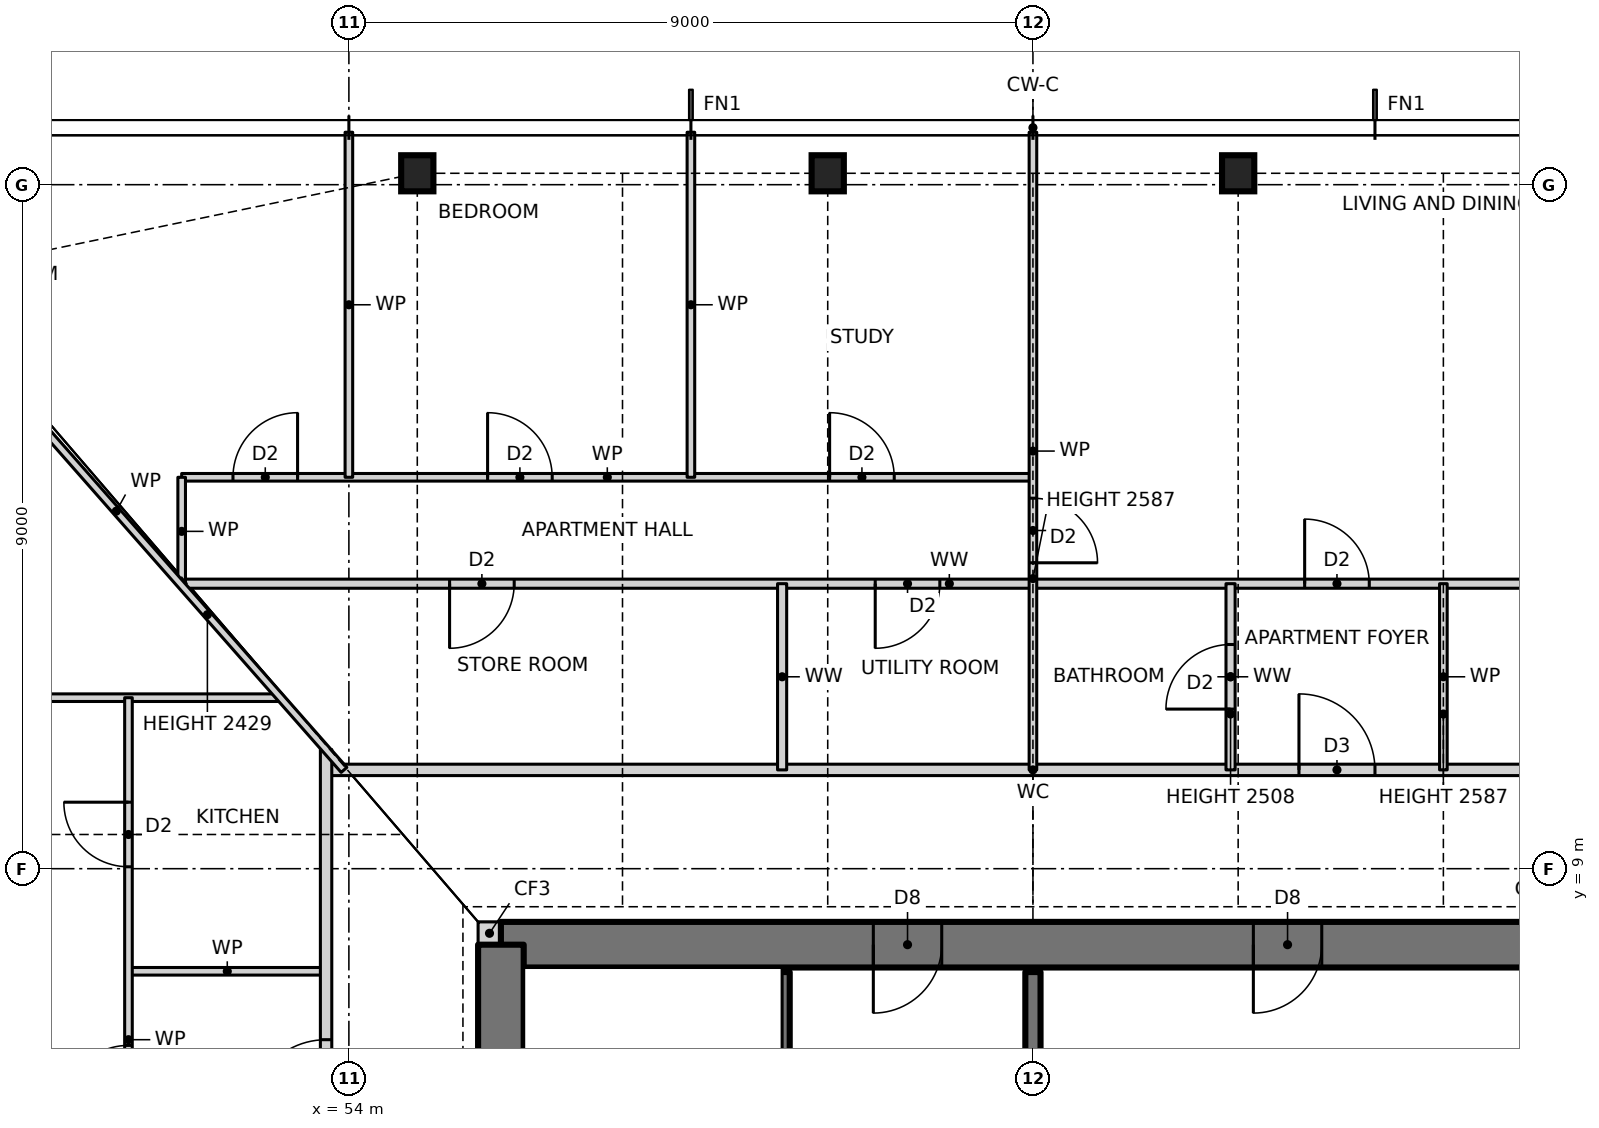
"""IFC4 building model, lengths in metres.
Left out: names, types, materials, properties, quantities, classifications, styles, units other than length and angle.
Written with IfcOpenShell. Run it as: python <this file> out.ifc"""

import sys

from ifc_helpers import new_model, si_unit, direction, frame, frame_2d, origin, origin_2d, place, context, subcontext, project, spatial, rectangle, i_section, extrude, element, fill, save


model = new_model("IFC4")
c1 = context("Model", 3, precision=1e-05, world=origin(), true_north=direction((0.0, 1.0)))
c2 = subcontext(c1, "Body", "Model", "MODEL_VIEW")
j1 = project(units=[si_unit("LENGTHUNIT", "METRE"), si_unit("PLANEANGLEUNIT", "RADIAN")], contexts=[c1])
p1 = place(None, origin())
s1 = spatial("IfcSite", under=j1, at=p1, CompositionType="ELEMENT")
p2 = place(p1, origin())
s2 = spatial("IfcBuilding", under=s1, at=p2, CompositionType="ELEMENT")
p3 = place(p2, frame((0.0, 0.0, 64.0)))
s3 = spatial("IfcBuildingStorey", under=s2, at=p3, CompositionType="ELEMENT", Elevation=64.0)
for number, where, z_axis, x_axis in (
    (1, (65.7, 18.15, 0.0), (0.0, 0.0, 1.0), (1.0, 0.0, 0.0)),
    (2, (60.3, 18.15, 0.0), (0.0, 0.0, 1.0), (1.0, 0.0, 0.0)),
    (3, (54.9, 18.15, 0.0), (0.0, 0.0, 1.0), (1.0, 0.0, 0.0)),
):
    element("IfcColumn", number, at=place(p3, frame(where, z_axis=z_axis, x_axis=x_axis)), inside=s3, PredefinedType="COLUMN", context=c2, shape_type="SweptSolid", body=[
        extrude(i_section(OverallWidth=0.424, OverallDepth=0.475, WebThickness=0.048, FlangeThickness=0.077, at=origin_2d()), origin(), (0.0, 0.0, 1.0), 3.5),
    ])
p4 = place(p3, frame((55.7, 8.15, 0.0), z_axis=(0.0, 0.0, 1.0), x_axis=(1.0, 0.0, 0.0)))
e4 = element("IfcWall", 4, at=p4, inside=s3, PredefinedType="SOLIDWALL", context=c2, shape_type="SweptSolid", body=[
    extrude(rectangle(XDim=0.3, YDim=0.3, at=frame_2d((0.15, 0.0))), origin(), (0.0, 0.0, 1.0), 3.5),
])
p5 = place(p3, frame((70.0, 8.0, 0.0), z_axis=(0.0, 0.0, 1.0), x_axis=(-1.0, 0.0, 0.0)))
e5 = element("IfcWall", 5, at=p5, inside=s3, PredefinedType="SHEAR", context=c2, shape_type="SweptSolid", body=[
    extrude(rectangle(XDim=14.0, YDim=0.6, at=frame_2d((7.0, 0.0))), origin(), (0.0, 0.0, 1.0), 3.5),
])
p6 = place(p5, frame((8.2, 0.0, 0.0)))
e6 = element("IfcOpeningElement", 6, at=p6, cuts=e5, PredefinedType="OPENING", context=c2, shape_type="SweptSolid", body=[
    extrude(rectangle(XDim=0.9, YDim=2.1, at=frame_2d((0.45, 1.05))), frame((0.0, 0.31, 0.0), z_axis=(0.0, -1.0, 0.0), x_axis=(1.0, 0.0, 0.0)), (0.0, 0.0, 1.0), 0.62),
])
p7 = place(p5, frame((3.2, 0.0, 0.0)))
e7 = element("IfcOpeningElement", 7, at=p7, cuts=e5, PredefinedType="OPENING", context=c2, shape_type="SweptSolid", body=[
    extrude(rectangle(XDim=0.9, YDim=2.1, at=frame_2d((0.45, 1.05))), frame((0.0, 0.31, 0.0), z_axis=(0.0, -1.0, 0.0), x_axis=(1.0, 0.0, 0.0)), (0.0, 0.0, 1.0), 0.62),
])
p8 = place(p3, frame((56.0, 8.0, 0.0), z_axis=(0.0, 0.0, 1.0), x_axis=(0.0, -1.0, 0.0)))
e8 = element("IfcWall", 8, at=p8, inside=s3, PredefinedType="SHEAR", context=c2, shape_type="SweptSolid", body=[
    extrude(rectangle(XDim=16.0, YDim=0.6, at=frame_2d((8.0, 0.0))), origin(), (0.0, 0.0, 1.0), 3.5),
])
p9 = place(p8, frame((7.5, 0.0, 0.0)))
e9 = element("IfcOpeningElement", 9, at=p9, cuts=e8, PredefinedType="OPENING", context=c2, shape_type="SweptSolid", body=[
    extrude(rectangle(XDim=1.0, YDim=2.1, at=frame_2d((0.5, 1.05))), frame((0.0, 0.31, 0.0), z_axis=(0.0, -1.0, 0.0), x_axis=(1.0, 0.0, 0.0)), (0.0, 0.0, 1.0), 0.62),
])
p10 = place(p3, frame((51.1, 7.65, 0.0), z_axis=(0.0, 0.0, 1.0), x_axis=(1.0, 0.0, 0.0)))
e10 = element("IfcWall", 10, at=p10, inside=s3, PredefinedType="PARTITIONING", context=c2, shape_type="SweptSolid", body=[
    extrude(rectangle(XDim=2.6, YDim=0.1, at=frame_2d((1.3, 0.0))), origin(), (0.0, 0.0, 1.0), 3.27),
])
p11 = place(p3, frame((53.7, 10.3, 0.0), z_axis=(0.0, 0.0, 1.0), x_axis=(1.0, 0.0, 0.0)))
e11 = element("IfcWall", 11, at=p11, inside=s3, PredefinedType="PARTITIONING", context=c2, shape_type="SweptSolid", body=[
    extrude(rectangle(XDim=18.6, YDim=0.15, at=frame_2d((9.3, 0.0))), origin(), (0.0, 0.0, 1.0), 3.27),
])
p12 = place(p11, frame((12.8, 0.0, 0.0)))
e12 = element("IfcOpeningElement", 12, at=p12, cuts=e11, PredefinedType="OPENING", context=c2, shape_type="SweptSolid", body=[
    extrude(rectangle(XDim=1.0, YDim=2.1, at=frame_2d((0.5, 1.05))), frame((0.0, 0.085, 0.0), z_axis=(0.0, -1.0, 0.0), x_axis=(1.0, 0.0, 0.0)), (0.0, 0.0, 1.0), 0.17),
])
p13 = place(p3, frame((46.56, 11.25, 0.0), z_axis=(0.0, 0.0, 1.0), x_axis=(1.0, 0.0, 0.0)))
e13 = element("IfcWall", 13, at=p13, inside=s3, PredefinedType="PARTITIONING", context=c2, shape_type="SweptSolid", body=[
    extrude(rectangle(XDim=6.54, YDim=0.1, at=frame_2d((3.27, 0.0))), origin(), (0.0, 0.0, 1.0), 3.27),
])
p14 = place(p13, frame((1.845, 0.0, 0.0)))
e14 = element("IfcOpeningElement", 14, at=p14, cuts=e13, PredefinedType="OPENING", context=c2, shape_type="SweptSolid", body=[
    extrude(rectangle(XDim=0.85, YDim=2.1, at=frame_2d((0.425, 1.05))), frame((0.0, 0.06, 0.0), z_axis=(0.0, -1.0, 0.0), x_axis=(1.0, 0.0, 0.0)), (0.0, 0.0, 1.0), 0.12),
])
p15 = place(p3, frame((51.8, 12.75, 0.0), z_axis=(0.0, 0.0, 1.0), x_axis=(1.0, 0.0, 0.0)))
e15 = element("IfcWall", 15, at=p15, inside=s3, PredefinedType="PARTITIONING", context=c2, shape_type="SweptSolid", body=[
    extrude(rectangle(XDim=20.2, YDim=0.12, at=frame_2d((10.1, 0.0))), origin(), (0.0, 0.0, 1.0), 3.27),
])
p16 = place(p15, frame((17.975, 0.0, 0.0)))
e16 = element("IfcOpeningElement", 16, at=p16, cuts=e15, PredefinedType="OPENING", context=c2, shape_type="SweptSolid", body=[
    extrude(rectangle(XDim=0.85, YDim=2.1, at=frame_2d((0.425, 1.05))), frame((0.0, 0.07, 0.0), z_axis=(0.0, -1.0, 0.0), x_axis=(1.0, 0.0, 0.0)), (0.0, 0.0, 1.0), 0.14),
])
p17 = place(p15, frame((14.775, 0.0, 0.0)))
e17 = element("IfcOpeningElement", 17, at=p17, cuts=e15, PredefinedType="OPENING", context=c2, shape_type="SweptSolid", body=[
    extrude(rectangle(XDim=0.85, YDim=2.1, at=frame_2d((0.425, 1.05))), frame((0.0, 0.07, 0.0), z_axis=(0.0, -1.0, 0.0), x_axis=(1.0, 0.0, 0.0)), (0.0, 0.0, 1.0), 0.14),
])
p18 = place(p15, frame((9.125, 0.0, 0.0)))
e18 = element("IfcOpeningElement", 18, at=p18, cuts=e15, PredefinedType="OPENING", context=c2, shape_type="SweptSolid", body=[
    extrude(rectangle(XDim=0.85, YDim=2.1, at=frame_2d((0.425, 1.05))), frame((0.0, 0.07, 0.0), z_axis=(0.0, -1.0, 0.0), x_axis=(1.0, 0.0, 0.0)), (0.0, 0.0, 1.0), 0.14),
])
p19 = place(p15, frame((3.525, 0.0, 0.0)))
e19 = element("IfcOpeningElement", 19, at=p19, cuts=e15, PredefinedType="OPENING", context=c2, shape_type="SweptSolid", body=[
    extrude(rectangle(XDim=0.85, YDim=2.1, at=frame_2d((0.425, 1.05))), frame((0.0, 0.07, 0.0), z_axis=(0.0, -1.0, 0.0), x_axis=(1.0, 0.0, 0.0)), (0.0, 0.0, 1.0), 0.14),
])
p20 = place(p3, frame((51.8, 14.15, 0.0), z_axis=(0.0, 0.0, 1.0), x_axis=(1.0, 0.0, 0.0)))
e20 = element("IfcWall", 20, at=p20, inside=s3, PredefinedType="PARTITIONING", context=c2, shape_type="SweptSolid", body=[
    extrude(rectangle(XDim=11.2, YDim=0.1, at=frame_2d((5.6, 0.0))), origin(), (0.0, 0.0, 1.0), 3.27),
])
p21 = place(p20, frame((8.525, 0.0, 0.0)))
e21 = element("IfcOpeningElement", 21, at=p21, cuts=e20, PredefinedType="OPENING", context=c2, shape_type="SweptSolid", body=[
    extrude(rectangle(XDim=0.85, YDim=2.1, at=frame_2d((0.425, 1.05))), frame((0.0, 0.06, 0.0), z_axis=(0.0, -1.0, 0.0), x_axis=(1.0, 0.0, 0.0)), (0.0, 0.0, 1.0), 0.12),
])
p22 = place(p20, frame((4.025, 0.0, 0.0)))
e22 = element("IfcOpeningElement", 22, at=p22, cuts=e20, PredefinedType="OPENING", context=c2, shape_type="SweptSolid", body=[
    extrude(rectangle(XDim=0.85, YDim=2.1, at=frame_2d((0.425, 1.05))), frame((0.0, 0.06, 0.0), z_axis=(0.0, -1.0, 0.0), x_axis=(1.0, 0.0, 0.0)), (0.0, 0.0, 1.0), 0.12),
])
p23 = place(p20, frame((0.675, 0.0, 0.0)))
e23 = element("IfcOpeningElement", 23, at=p23, cuts=e20, PredefinedType="OPENING", context=c2, shape_type="SweptSolid", body=[
    extrude(rectangle(XDim=0.85, YDim=2.1, at=frame_2d((0.425, 1.05))), frame((0.0, 0.06, 0.0), z_axis=(0.0, -1.0, 0.0), x_axis=(1.0, 0.0, 0.0)), (0.0, 0.0, 1.0), 0.12),
])
p24 = place(p3, frame((68.4, 10.3, 0.0), z_axis=(0.0, 0.0, 1.0), x_axis=(0.0, 1.0, 0.0)))
e24 = element("IfcWall", 24, at=p24, inside=s3, PredefinedType="PARTITIONING", context=c2, shape_type="SweptSolid", body=[
    extrude(rectangle(XDim=2.45, YDim=0.1, at=frame_2d((1.225, 0.0))), origin(), (0.0, 0.0, 1.0), 2.587),
])
p25 = place(p3, frame((65.6, 10.3, 0.0), z_axis=(0.0, 0.0, 1.0), x_axis=(0.0, 1.0, 0.0)))
e25 = element("IfcWall", 25, at=p25, inside=s3, PredefinedType="PARTITIONING", context=c2, shape_type="SweptSolid", body=[
    extrude(rectangle(XDim=2.45, YDim=0.12, at=frame_2d((1.225, 0.0))), origin(), (0.0, 0.0, 1.0), 2.508),
])
p26 = place(p25, frame((0.8, 0.0, 0.0)))
e26 = element("IfcOpeningElement", 26, at=p26, cuts=e25, PredefinedType="OPENING", context=c2, shape_type="SweptSolid", body=[
    extrude(rectangle(XDim=0.85, YDim=2.1, at=frame_2d((0.425, 1.05))), frame((0.0, 0.07, 0.0), z_axis=(0.0, -1.0, 0.0), x_axis=(1.0, 0.0, 0.0)), (0.0, 0.0, 1.0), 0.14),
])
p27 = place(p3, frame((63.0, 3.85, 0.0), z_axis=(0.0, 0.0, 1.0), x_axis=(0.0, 1.0, 0.0)))
e27 = element("IfcWall", 27, at=p27, inside=s3, PredefinedType="SOLIDWALL", context=c2, shape_type="SweptSolid", body=[
    extrude(rectangle(XDim=3.79, YDim=0.2, at=frame_2d((1.895, 0.0))), origin(), (0.0, 0.0, 1.0), 3.5),
])
p28 = place(p3, frame((63.0, 10.3, 0.0), z_axis=(0.0, 0.0, 1.0), x_axis=(0.0, 1.0, 0.0)))
e28 = element("IfcWall", 28, at=p28, inside=s3, PredefinedType="PARTITIONING", context=c2, shape_type="SweptSolid", body=[
    extrude(rectangle(XDim=8.39, YDim=0.1, at=frame_2d((4.195, 0.0))), origin(), (0.0, 0.0, 1.0), 2.587),
])
p29 = place(p28, frame((2.725, 0.0, 0.0)))
e29 = element("IfcOpeningElement", 29, at=p29, cuts=e28, PredefinedType="OPENING", context=c2, shape_type="SweptSolid", body=[
    extrude(rectangle(XDim=0.85, YDim=2.1, at=frame_2d((0.425, 1.05))), frame((0.0, 0.06, 0.0), z_axis=(0.0, -1.0, 0.0), x_axis=(1.0, 0.0, 0.0)), (0.0, 0.0, 1.0), 0.12),
])
p30 = place(p3, frame((59.7, 1.05, 0.0), z_axis=(0.0, 0.0, 1.0), x_axis=(0.0, 1.0, 0.0)))
e30 = element("IfcWall", 30, at=p30, inside=s3, PredefinedType="SOLIDWALL", context=c2, shape_type="SweptSolid", body=[
    extrude(rectangle(XDim=6.59, YDim=0.2, at=frame_2d((3.295, 0.0))), origin(), (0.0, 0.0, 1.0), 3.5),
])
p31 = place(p3, frame((59.7, 10.3, 0.0), z_axis=(0.0, 0.0, 1.0), x_axis=(0.0, 1.0, 0.0)))
e31 = element("IfcWall", 31, at=p31, inside=s3, PredefinedType="PARTITIONING", context=c2, shape_type="SweptSolid", body=[
    extrude(rectangle(XDim=2.45, YDim=0.12, at=frame_2d((1.225, 0.0))), origin(), (0.0, 0.0, 1.0), 3.27),
])
for number, where, z_axis, x_axis in (
    (32, (58.5, 14.15, 0.0), (0.0, 0.0, 1.0), (0.0, 1.0, 0.0)),
    (33, (54.0, 14.15, 0.0), (0.0, 0.0, 1.0), (0.0, 1.0, 0.0)),
):
    element("IfcWall", number, at=place(p3, frame(where, z_axis=z_axis, x_axis=x_axis)), inside=s3, PredefinedType="PARTITIONING", context=c2, shape_type="SweptSolid", body=[
        extrude(rectangle(XDim=4.54, YDim=0.1, at=frame_2d((2.27, 0.0))), origin(), (0.0, 0.0, 1.0), 3.27),
    ])
p32 = place(p3, frame((53.7, -10.9, 0.0), z_axis=(0.0, 0.0, 1.0), x_axis=(0.0, 1.0, 0.0)))
e34 = element("IfcWall", 34, at=p32, inside=s3, PredefinedType="PARTITIONING", context=c2, shape_type="SweptSolid", body=[
    extrude(rectangle(XDim=21.468, YDim=0.15, at=frame_2d((10.734, 0.0))), origin(), (0.0, 0.0, 1.0), 3.27),
])
p33 = place(p32, frame((16.65, 0.0, 0.0)))
e35 = element("IfcOpeningElement", 35, at=p33, cuts=e34, PredefinedType="OPENING", context=c2, shape_type="SweptSolid", body=[
    extrude(rectangle(XDim=1.0, YDim=2.1, at=frame_2d((0.5, 1.05))), frame((0.0, 0.085, 0.0), z_axis=(0.0, -1.0, 0.0), x_axis=(1.0, 0.0, 0.0)), (0.0, 0.0, 1.0), 0.17),
])
p34 = place(p32, frame((11.25, 0.0, 0.0)))
e36 = element("IfcOpeningElement", 36, at=p34, cuts=e34, PredefinedType="OPENING", context=c2, shape_type="SweptSolid", body=[
    extrude(rectangle(XDim=1.0, YDim=2.1, at=frame_2d((0.5, 1.05))), frame((0.0, 0.085, 0.0), z_axis=(0.0, -1.0, 0.0), x_axis=(1.0, 0.0, 0.0)), (0.0, 0.0, 1.0), 0.17),
])
p35 = place(p3, frame((51.8, 12.727, 0.0), z_axis=(0.0, 0.0, 1.0), x_axis=(0.0, 1.0, 0.0)))
e37 = element("IfcWall", 37, at=p35, inside=s3, PredefinedType="PARTITIONING", context=c2, shape_type="SweptSolid", body=[
    extrude(rectangle(XDim=1.423, YDim=0.1, at=frame_2d((0.711, 0.0))), origin(), (0.0, 0.0, 1.0), 3.27),
])
p36 = place(p3, frame((51.1, 2.25, 0.0), z_axis=(0.0, 0.0, 1.0), x_axis=(0.0, 1.0, 0.0)))
e38 = element("IfcWall", 38, at=p36, inside=s3, PredefinedType="PARTITIONING", context=c2, shape_type="SweptSolid", body=[
    extrude(rectangle(XDim=9.0, YDim=0.1, at=frame_2d((4.5, 0.0))), origin(), (0.0, 0.0, 1.0), 3.27),
])
p37 = place(p36, frame((6.775, 0.0, 0.0)))
e39 = element("IfcOpeningElement", 39, at=p37, cuts=e38, PredefinedType="OPENING", context=c2, shape_type="SweptSolid", body=[
    extrude(rectangle(XDim=0.85, YDim=2.1, at=frame_2d((0.425, 1.05))), frame((0.0, 0.06, 0.0), z_axis=(0.0, -1.0, 0.0), x_axis=(1.0, 0.0, 0.0)), (0.0, 0.0, 1.0), 0.12),
])
p38 = place(p36, frame((3.575, 0.0, 0.0)))
e40 = element("IfcOpeningElement", 40, at=p38, cuts=e38, PredefinedType="OPENING", context=c2, shape_type="SweptSolid", body=[
    extrude(rectangle(XDim=0.85, YDim=2.1, at=frame_2d((0.425, 1.05))), frame((0.0, 0.06, 0.0), z_axis=(0.0, -1.0, 0.0), x_axis=(1.0, 0.0, 0.0)), (0.0, 0.0, 1.0), 0.12),
])
p39 = place(p3, frame((53.936, 10.3, 0.0), z_axis=(0.0, 0.0, 1.0), x_axis=(-0.660638210404, 0.750704439146, 0.0)))
e41 = element("IfcWall", 41, at=p39, inside=s3, PredefinedType="PARTITIONING", context=c2, shape_type="SweptSolid", body=[
    extrude(rectangle(XDim=9.07, YDim=0.1, at=frame_2d((4.535, 0.0))), origin(), (0.0, 0.0, 1.0), 2.429),
])
p40 = place(p12, origin())
e42 = element("IfcDoor", 42, at=p40, inside=s3, OperationType="SINGLE_SWING_LEFT", PredefinedType="DOOR", context=c2, shape_type="SweptSolid", body=[
    extrude(rectangle(XDim=1.0, YDim=2.1, at=frame_2d((0.5, 1.05))), frame((0.0, 0.025, 0.0), z_axis=(0.0, -1.0, 0.0), x_axis=(1.0, 0.0, 0.0)), (0.0, 0.0, 1.0), 0.05),
])
fill(e12, e42)
p41 = place(p17, origin())
e43 = element("IfcDoor", 43, at=p41, inside=s3, OperationType="SINGLE_SWING_LEFT", PredefinedType="DOOR", context=c2, shape_type="SweptSolid", body=[
    extrude(rectangle(XDim=0.85, YDim=2.1, at=frame_2d((0.425, 1.05))), frame((0.0, 0.025, 0.0), z_axis=(0.0, -1.0, 0.0), x_axis=(1.0, 0.0, 0.0)), (0.0, 0.0, 1.0), 0.05),
])
fill(e17, e43)
p42 = place(p26, origin())
e44 = element("IfcDoor", 44, at=p42, inside=s3, OperationType="SINGLE_SWING_LEFT", PredefinedType="DOOR", context=c2, shape_type="SweptSolid", body=[
    extrude(rectangle(XDim=0.85, YDim=2.1, at=frame_2d((0.425, 1.05))), frame((0.0, 0.025, 0.0), z_axis=(0.0, -1.0, 0.0), x_axis=(1.0, 0.0, 0.0)), (0.0, 0.0, 1.0), 0.05),
])
fill(e26, e44)
p43 = place(p29, frame((0.85, 0.0, 0.0), z_axis=(0.0, 0.0, 1.0), x_axis=(-1.0, 0.0, 0.0)))
e45 = element("IfcDoor", 45, at=p43, inside=s3, OperationType="SINGLE_SWING_RIGHT", PredefinedType="DOOR", context=c2, shape_type="SweptSolid", body=[
    extrude(rectangle(XDim=0.85, YDim=2.1, at=frame_2d((0.425, 1.05))), frame((0.0, 0.025, 0.0), z_axis=(0.0, -1.0, 0.0), x_axis=(1.0, 0.0, 0.0)), (0.0, 0.0, 1.0), 0.05),
])
fill(e29, e45)
p44 = place(p21, origin())
e46 = element("IfcDoor", 46, at=p44, inside=s3, OperationType="SINGLE_SWING_LEFT", PredefinedType="DOOR", context=c2, shape_type="SweptSolid", body=[
    extrude(rectangle(XDim=0.85, YDim=2.1, at=frame_2d((0.425, 1.05))), frame((0.0, 0.025, 0.0), z_axis=(0.0, -1.0, 0.0), x_axis=(1.0, 0.0, 0.0)), (0.0, 0.0, 1.0), 0.05),
])
fill(e21, e46)
p45 = place(p22, origin())
e47 = element("IfcDoor", 47, at=p45, inside=s3, OperationType="SINGLE_SWING_LEFT", PredefinedType="DOOR", context=c2, shape_type="SweptSolid", body=[
    extrude(rectangle(XDim=0.85, YDim=2.1, at=frame_2d((0.425, 1.05))), frame((0.0, 0.025, 0.0), z_axis=(0.0, -1.0, 0.0), x_axis=(1.0, 0.0, 0.0)), (0.0, 0.0, 1.0), 0.05),
])
fill(e22, e47)
p46 = place(p23, origin())
e48 = element("IfcDoor", 48, at=p46, inside=s3, OperationType="SINGLE_SWING_RIGHT", PredefinedType="DOOR", context=c2, shape_type="SweptSolid", body=[
    extrude(rectangle(XDim=0.85, YDim=2.1, at=frame_2d((0.425, 1.05))), frame((0.0, 0.025, 0.0), z_axis=(0.0, -1.0, 0.0), x_axis=(1.0, 0.0, 0.0)), (0.0, 0.0, 1.0), 0.05),
])
fill(e23, e48)
p47 = place(p18, frame((0.85, 0.0, 0.0), z_axis=(0.0, 0.0, 1.0), x_axis=(-1.0, 0.0, 0.0)))
e49 = element("IfcDoor", 49, at=p47, inside=s3, OperationType="SINGLE_SWING_RIGHT", PredefinedType="DOOR", context=c2, shape_type="SweptSolid", body=[
    extrude(rectangle(XDim=0.85, YDim=2.1, at=frame_2d((0.425, 1.05))), frame((0.0, 0.025, 0.0), z_axis=(0.0, -1.0, 0.0), x_axis=(1.0, 0.0, 0.0)), (0.0, 0.0, 1.0), 0.05),
])
fill(e18, e49)
p48 = place(p19, frame((0.85, 0.0, 0.0), z_axis=(0.0, 0.0, 1.0), x_axis=(-1.0, 0.0, 0.0)))
e50 = element("IfcDoor", 50, at=p48, inside=s3, OperationType="SINGLE_SWING_RIGHT", PredefinedType="DOOR", context=c2, shape_type="SweptSolid", body=[
    extrude(rectangle(XDim=0.85, YDim=2.1, at=frame_2d((0.425, 1.05))), frame((0.0, 0.025, 0.0), z_axis=(0.0, -1.0, 0.0), x_axis=(1.0, 0.0, 0.0)), (0.0, 0.0, 1.0), 0.05),
])
fill(e19, e50)
p49 = place(p37, origin())
e51 = element("IfcDoor", 51, at=p49, inside=s3, OperationType="SINGLE_SWING_RIGHT", PredefinedType="DOOR", context=c2, shape_type="SweptSolid", body=[
    extrude(rectangle(XDim=0.85, YDim=2.1, at=frame_2d((0.425, 1.05))), frame((0.0, 0.025, 0.0), z_axis=(0.0, -1.0, 0.0), x_axis=(1.0, 0.0, 0.0)), (0.0, 0.0, 1.0), 0.05),
])
fill(e39, e51)
p50 = place(p33, origin())
e52 = element("IfcDoor", 52, at=p50, inside=s3, OperationType="SINGLE_SWING_LEFT", PredefinedType="DOOR", context=c2, shape_type="SweptSolid", body=[
    extrude(rectangle(XDim=1.0, YDim=2.1, at=frame_2d((0.5, 1.05))), frame((0.0, 0.025, 0.0), z_axis=(0.0, -1.0, 0.0), x_axis=(1.0, 0.0, 0.0)), (0.0, 0.0, 1.0), 0.05),
])
fill(e35, e52)
p51 = place(p38, origin())
e53 = element("IfcDoor", 53, at=p51, inside=s3, OperationType="SINGLE_SWING_LEFT", PredefinedType="DOOR", context=c2, shape_type="SweptSolid", body=[
    extrude(rectangle(XDim=0.85, YDim=2.1, at=frame_2d((0.425, 1.05))), frame((0.0, 0.025, 0.0), z_axis=(0.0, -1.0, 0.0), x_axis=(1.0, 0.0, 0.0)), (0.0, 0.0, 1.0), 0.05),
])
fill(e40, e53)
p52 = place(p6, origin())
e54 = element("IfcDoor", 54, at=p52, inside=s3, OperationType="SINGLE_SWING_RIGHT", PredefinedType="DOOR", context=c2, shape_type="SweptSolid", body=[
    extrude(rectangle(XDim=0.9, YDim=2.1, at=frame_2d((0.45, 1.05))), frame((0.0, 0.025, 0.0), z_axis=(0.0, -1.0, 0.0), x_axis=(1.0, 0.0, 0.0)), (0.0, 0.0, 1.0), 0.05),
])
fill(e6, e54)
p53 = place(p7, origin())
e55 = element("IfcDoor", 55, at=p53, inside=s3, OperationType="SINGLE_SWING_RIGHT", PredefinedType="DOOR", context=c2, shape_type="SweptSolid", body=[
    extrude(rectangle(XDim=0.9, YDim=2.1, at=frame_2d((0.45, 1.05))), frame((0.0, 0.025, 0.0), z_axis=(0.0, -1.0, 0.0), x_axis=(1.0, 0.0, 0.0)), (0.0, 0.0, 1.0), 0.05),
])
fill(e7, e55)
save(model, sys.argv[1])
